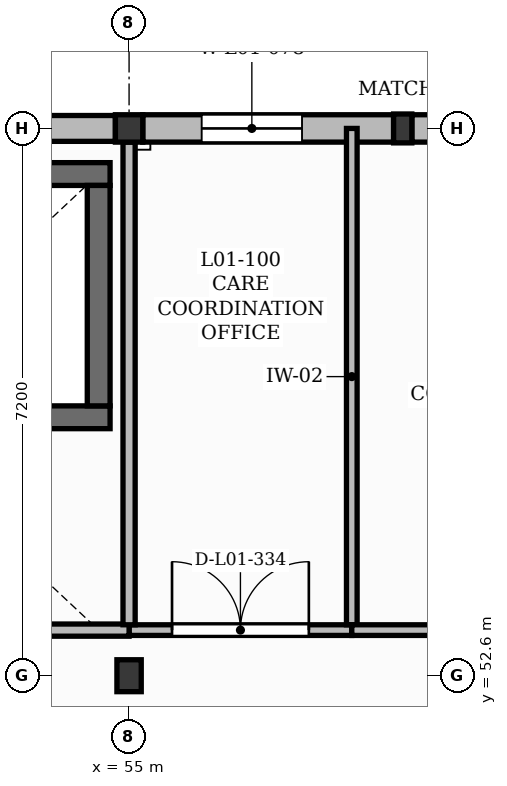
"""IFC4 building model, lengths in metres.
Left out: names, types, materials, properties, quantities, classifications, styles, units other than length and angle.
Written with IfcOpenShell. Run it as: python <this file> out.ifc"""

import sys

from ifc_helpers import new_model, si_unit, direction, frame, frame_2d, origin, origin_2d, place, context, subcontext, project, spatial, rectangle, extrude, element, fill, save


model = new_model("IFC4")
c1 = context("Model", 3, precision=1e-05, world=origin(), true_north=direction((0.0, 1.0)))
c2 = subcontext(c1, "Body", "Model", "MODEL_VIEW")
j1 = project(units=[si_unit("LENGTHUNIT", "METRE"), si_unit("PLANEANGLEUNIT", "RADIAN")], contexts=[c1])
p1 = place(None, origin())
s1 = spatial("IfcSite", under=j1, at=p1, CompositionType="ELEMENT")
p2 = place(p1, origin())
s2 = spatial("IfcBuilding", under=s1, at=p2, CompositionType="ELEMENT")
p3 = place(p2, frame((0.0, 0.0, 4.5)))
s3 = spatial("IfcBuildingStorey", under=s2, at=p3, CompositionType="ELEMENT", Elevation=4.5)
p4 = place(p3, frame((55.0, 52.6, 0.0), z_axis=(0.0, 0.0, 1.0), x_axis=(1.0, 0.0, 0.0)))
e1 = element("IfcColumn", 1, at=p4, inside=s3, PredefinedType="COLUMN", context=c2, shape_type="SweptSolid", body=[
    extrude(rectangle(XDim=0.32, YDim=0.42, at=origin_2d()), origin(), (0.0, 0.0, 1.0), 4.26),
])
p5 = place(p3, frame((55.0, 59.8, 0.0), z_axis=(0.0, 0.0, 1.0), x_axis=(1.0, 0.0, 0.0)))
e2 = element("IfcColumn", 2, at=p5, inside=s3, PredefinedType="COLUMN", context=c2, shape_type="SweptSolid", body=[
    extrude(rectangle(XDim=0.36, YDim=0.36, at=origin_2d()), origin(), (0.0, 0.0, 1.0), 4.26),
])
p6 = place(p3, frame((58.6, 59.8, 0.0), z_axis=(0.0, 0.0, 1.0), x_axis=(1.0, 0.0, 0.0)))
e3 = element("IfcColumn", 3, at=p6, inside=s3, PredefinedType="PILASTER", context=c2, shape_type="SweptSolid", body=[
    extrude(rectangle(XDim=0.24, YDim=0.38, at=origin_2d()), origin(), (0.0, 0.0, 1.0), 4.26),
])
p7 = place(p3, frame((51.52, 59.8, 0.0), z_axis=(0.0, 0.0, 1.0), x_axis=(1.0, 0.0, 0.0)))
e4 = element("IfcWall", 4, at=p7, inside=s3, PredefinedType="SOLIDWALL", context=c2, shape_type="SweptSolid", body=[
    extrude(rectangle(XDim=3.3, YDim=0.34, at=frame_2d((1.65, 0.0))), origin(), (0.0, 0.0, 1.0), 3.8),
])
p8 = place(p3, frame((55.18, 59.8, 0.0), z_axis=(0.0, 0.0, 1.0), x_axis=(1.0, 0.0, 0.0)))
e5 = element("IfcWall", 5, at=p8, inside=s3, PredefinedType="SOLIDWALL", context=c2, shape_type="SweptSolid", body=[
    extrude(rectangle(XDim=3.3, YDim=0.36, at=frame_2d((1.65, 0.0))), origin(), (0.0, 0.0, 1.0), 3.8),
])
p9 = place(p8, frame((0.775, 0.0, 1.5)))
e6 = element("IfcOpeningElement", 6, at=p9, cuts=e5, PredefinedType="OPENING", context=c2, shape_type="SweptSolid", body=[
    extrude(rectangle(XDim=1.32, YDim=1.25, at=frame_2d((0.66, 0.625))), frame((0.0, 0.19, 0.0), z_axis=(0.0, -1.0, 0.0), x_axis=(1.0, 0.0, 0.0)), (0.0, 0.0, 1.0), 0.38),
])
p10 = place(p3, frame((58.72, 59.8, 0.0), z_axis=(0.0, 0.0, 1.0), x_axis=(1.0, 0.0, 0.0)))
e7 = element("IfcWall", 7, at=p10, inside=s3, PredefinedType="SOLIDWALL", context=c2, shape_type="SweptSolid", body=[
    extrude(rectangle(XDim=3.32, YDim=0.36, at=frame_2d((1.66, 0.0))), origin(), (0.0, 0.0, 1.0), 3.8),
])
p11 = place(p10, frame((1.03, 0.0, 1.05)))
e8 = element("IfcOpeningElement", 8, at=p11, cuts=e7, PredefinedType="OPENING", context=c2, shape_type="SweptSolid", body=[
    extrude(rectangle(XDim=1.26, YDim=1.65, at=frame_2d((0.63, 0.825))), frame((0.0, 0.19, 0.0), z_axis=(0.0, -1.0, 0.0), x_axis=(1.0, 0.0, 0.0)), (0.0, 0.0, 1.0), 0.38),
])
for number, where, z_axis, x_axis in (
    (9, (48.05, 56.0, 0.0), (0.0, 0.0, 1.0), (1.0, 0.0, 0.0)),
    (10, (48.05, 59.2, 0.0), (0.0, 0.0, 1.0), (1.0, 0.0, 0.0)),
):
    element("IfcWall", number, at=place(p3, frame(where, z_axis=z_axis, x_axis=x_axis)), inside=s3, PredefinedType="SHEAR", context=c2, shape_type="SweptSolid", body=[
        extrude(rectangle(XDim=6.7, YDim=0.3, at=frame_2d((3.35, 0.0))), origin(), (0.0, 0.0, 1.0), 4.25),
    ])
p12 = place(p3, frame((54.6, 56.15, 0.0), z_axis=(0.0, 0.0, 1.0), x_axis=(0.0, 1.0, 0.0)))
e11 = element("IfcWall", 11, at=p12, inside=s3, PredefinedType="SHEAR", context=c2, shape_type="SweptSolid", body=[
    extrude(rectangle(XDim=2.9, YDim=0.3, at=frame_2d((1.45, 0.0))), origin(), (0.0, 0.0, 1.0), 4.25),
])
p13 = place(p3, frame((55.0, 53.2, 0.0), z_axis=(0.0, 0.0, 1.0), x_axis=(1.0, 0.0, 0.0)))
e12 = element("IfcWall", 12, at=p13, inside=s3, PredefinedType="PARTITIONING", context=c2, shape_type="SweptSolid", body=[
    extrude(rectangle(XDim=2.93, YDim=0.14, at=frame_2d((1.465, 0.0))), origin(), (0.0, 0.0, 1.0), 4.18),
])
p14 = place(p13, frame((0.565, 0.0, 0.0)))
e13 = element("IfcOpeningElement", 13, at=p14, cuts=e12, PredefinedType="OPENING", context=c2, shape_type="SweptSolid", body=[
    extrude(rectangle(XDim=1.8, YDim=2.3, at=frame_2d((0.9, 1.15))), frame((0.0, 0.08, 0.0), z_axis=(0.0, -1.0, 0.0), x_axis=(1.0, 0.0, 0.0)), (0.0, 0.0, 1.0), 0.16),
])
p15 = place(p3, frame((57.93, 53.27, 0.0), z_axis=(0.0, 0.0, 1.0), x_axis=(0.0, 1.0, 0.0)))
e14 = element("IfcWall", 14, at=p15, inside=s3, PredefinedType="PARTITIONING", context=c2, shape_type="SweptSolid", body=[
    extrude(rectangle(XDim=6.53, YDim=0.14, at=frame_2d((3.265, 0.0))), origin(), (0.0, 0.0, 1.0), 4.18),
])
p16 = place(p3, frame((57.93, 53.2, 0.0), z_axis=(0.0, 0.0, 1.0), x_axis=(1.0, 0.0, 0.0)))
e15 = element("IfcWall", 15, at=p16, inside=s3, PredefinedType="PARTITIONING", context=c2, shape_type="SweptSolid", body=[
    extrude(rectangle(XDim=4.27, YDim=0.14, at=frame_2d((2.135, 0.0))), origin(), (0.0, 0.0, 1.0), 4.18),
])
p17 = place(p16, frame((1.615, 0.0, 0.0)))
e16 = element("IfcOpeningElement", 16, at=p17, cuts=e15, PredefinedType="OPENING", context=c2, shape_type="SweptSolid", body=[
    extrude(rectangle(XDim=1.04, YDim=2.1, at=frame_2d((0.52, 1.05))), frame((0.0, 0.08, 0.0), z_axis=(0.0, -1.0, 0.0), x_axis=(1.0, 0.0, 0.0)), (0.0, 0.0, 1.0), 0.16),
])
p18 = place(p3, frame((55.0, 53.2, 0.0), z_axis=(0.0, 0.0, 1.0), x_axis=(-1.0, 0.0, 0.0)))
e17 = element("IfcWall", 17, at=p18, inside=s3, PredefinedType="PARTITIONING", context=c2, shape_type="SweptSolid", body=[
    extrude(rectangle(XDim=2.8, YDim=0.16, at=frame_2d((1.4, 0.0))), origin(), (0.0, 0.0, 1.0), 4.18),
])
p19 = place(p3, frame((55.0, 53.27, 0.0), z_axis=(0.0, 0.0, 1.0), x_axis=(0.0, 1.0, 0.0)))
e18 = element("IfcWall", 18, at=p19, inside=s3, PredefinedType="PARTITIONING", context=c2, shape_type="SweptSolid", body=[
    extrude(rectangle(XDim=6.35, YDim=0.16, at=frame_2d((3.175, 0.0))), origin(), (0.0, 0.0, 1.0), 3.74),
])
p20 = place(p9, origin())
e19 = element("IfcWindow", 19, at=p20, inside=s3, PartitioningType="SINGLE_PANEL", PredefinedType="WINDOW", context=c2, shape_type="SweptSolid", body=[
    extrude(rectangle(XDim=1.32, YDim=1.25, at=frame_2d((0.66, 0.625))), frame((0.0, 0.03, 0.0), z_axis=(0.0, -1.0, 0.0), x_axis=(1.0, 0.0, 0.0)), (0.0, 0.0, 1.0), 0.06),
])
fill(e6, e19)
p21 = place(p14, origin())
e20 = element("IfcDoor", 20, at=p21, inside=s3, OperationType="DOUBLE_DOOR_SINGLE_SWING", PredefinedType="DOOR", context=c2, shape_type="SweptSolid", body=[
    extrude(rectangle(XDim=1.8, YDim=2.3, at=frame_2d((0.9, 1.15))), frame((0.0, 0.025, 0.0), z_axis=(0.0, -1.0, 0.0), x_axis=(1.0, 0.0, 0.0)), (0.0, 0.0, 1.0), 0.05),
])
fill(e13, e20)
save(model, sys.argv[1])
